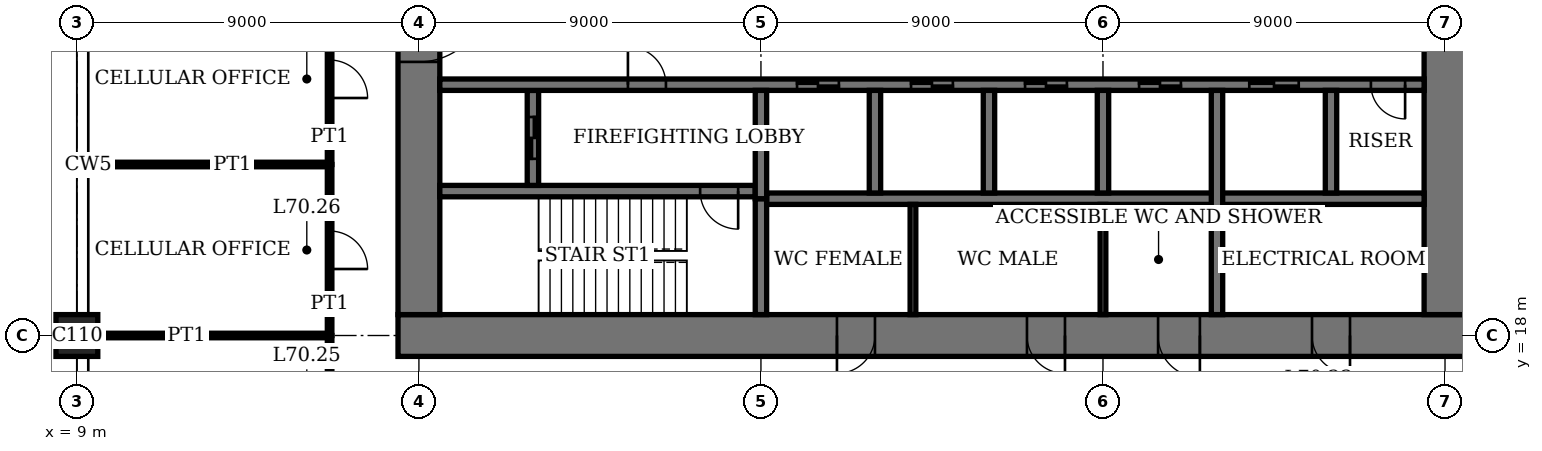
"""IFC4 building model, lengths in metres.
Left out: names, types, materials, properties, quantities, classifications, styles, units other than length and angle.
Written with IfcOpenShell. Run it as: python <this file> out.ifc"""

import sys

from ifc_helpers import new_model, si_unit, direction, frame, frame_2d, origin, origin_2d, place, context, subcontext, project, spatial, rectangle, extrude, element, fill, save


model = new_model("IFC4")
c1 = context("Model", 3, precision=1e-05, world=origin(), true_north=direction((0.0, 1.0)))
c2 = subcontext(c1, "Body", "Model", "MODEL_VIEW")
j1 = project(units=[si_unit("LENGTHUNIT", "METRE"), si_unit("PLANEANGLEUNIT", "RADIAN")], contexts=[c1])
p1 = place(None, origin())
s1 = spatial("IfcSite", under=j1, at=p1, CompositionType="ELEMENT")
p2 = place(p1, origin())
s2 = spatial("IfcBuilding", under=s1, at=p2, CompositionType="ELEMENT")
p3 = place(p2, frame((0.0, 0.0, 287.4)))
s3 = spatial("IfcBuildingStorey", under=s2, at=p3, CompositionType="ELEMENT", Elevation=287.4)
p4 = place(p3, frame((9.0, 18.0, 0.0), z_axis=(0.0, 0.0, 1.0), x_axis=(1.0, 0.0, 0.0)))
e1 = element("IfcColumn", 1, at=p4, inside=s3, PredefinedType="COLUMN", context=c2, shape_type="SweptSolid", body=[
    extrude(rectangle(XDim=1.1, YDim=1.1, at=origin_2d()), origin(), (0.0, 0.0, 1.0), 4.0),
])
p5 = place(p3, frame((17.45, 18.0, 0.0), z_axis=(0.0, 0.0, 1.0), x_axis=(1.0, 0.0, 0.0)))
e2 = element("IfcWall", 2, at=p5, inside=s3, PredefinedType="SHEAR", context=c2, shape_type="SweptSolid", body=[
    extrude(rectangle(XDim=28.1, YDim=1.1, at=frame_2d((14.05, 0.0))), origin(), (0.0, 0.0, 1.0), 4.0),
])
p6 = place(p5, frame((11.55, 0.0, 0.0)))
e3 = element("IfcOpeningElement", 3, at=p6, cuts=e2, PredefinedType="OPENING", context=c2, shape_type="SweptSolid", body=[
    extrude(rectangle(XDim=1.0, YDim=2.4, at=frame_2d((0.5, 1.2))), frame((0.0, 0.56, 0.0), z_axis=(0.0, -1.0, 0.0), x_axis=(1.0, 0.0, 0.0)), (0.0, 0.0, 1.0), 1.12),
])
p7 = place(p5, frame((16.55, 0.0, 0.0)))
e4 = element("IfcOpeningElement", 4, at=p7, cuts=e2, PredefinedType="OPENING", context=c2, shape_type="SweptSolid", body=[
    extrude(rectangle(XDim=1.0, YDim=2.4, at=frame_2d((0.5, 1.2))), frame((0.0, 0.56, 0.0), z_axis=(0.0, -1.0, 0.0), x_axis=(1.0, 0.0, 0.0)), (0.0, 0.0, 1.0), 1.12),
])
p8 = place(p5, frame((20.0, 0.0, 0.0)))
e5 = element("IfcOpeningElement", 5, at=p8, cuts=e2, PredefinedType="OPENING", context=c2, shape_type="SweptSolid", body=[
    extrude(rectangle(XDim=1.1, YDim=2.4, at=frame_2d((0.55, 1.2))), frame((0.0, 0.56, 0.0), z_axis=(0.0, -1.0, 0.0), x_axis=(1.0, 0.0, 0.0)), (0.0, 0.0, 1.0), 1.12),
])
p9 = place(p5, frame((24.05, 0.0, 0.0)))
e6 = element("IfcOpeningElement", 6, at=p9, cuts=e2, PredefinedType="OPENING", context=c2, shape_type="SweptSolid", body=[
    extrude(rectangle(XDim=1.0, YDim=2.4, at=frame_2d((0.5, 1.2))), frame((0.0, 0.56, 0.0), z_axis=(0.0, -1.0, 0.0), x_axis=(1.0, 0.0, 0.0)), (0.0, 0.0, 1.0), 1.12),
])
p10 = place(p3, frame((18.0, 35.45, 0.0), z_axis=(0.0, 0.0, 1.0), x_axis=(0.0, -1.0, 0.0)))
e7 = element("IfcWall", 7, at=p10, inside=s3, PredefinedType="SHEAR", context=c2, shape_type="SweptSolid", body=[
    extrude(rectangle(XDim=16.9, YDim=1.1, at=frame_2d((8.45, 0.0))), origin(), (0.0, 0.0, 1.0), 4.0),
])
p11 = place(p10, frame((8.45, 0.0, 0.0)))
e8 = element("IfcOpeningElement", 8, at=p11, cuts=e7, PredefinedType="OPENING", context=c2, shape_type="SweptSolid", body=[
    extrude(rectangle(XDim=1.8, YDim=2.4, at=frame_2d((0.9, 1.2))), frame((0.0, 0.56, 0.0), z_axis=(0.0, -1.0, 0.0), x_axis=(1.0, 0.0, 0.0)), (0.0, 0.0, 1.0), 1.12),
])
p12 = place(p3, frame((45.0, 18.55, 0.0), z_axis=(0.0, 0.0, 1.0), x_axis=(0.0, 1.0, 0.0)))
e9 = element("IfcWall", 9, at=p12, inside=s3, PredefinedType="SHEAR", context=c2, shape_type="SweptSolid", body=[
    extrude(rectangle(XDim=16.9, YDim=1.1, at=frame_2d((8.45, 0.0))), origin(), (0.0, 0.0, 1.0), 4.0),
])
p13 = place(p12, frame((8.45, 0.0, 0.0)))
e10 = element("IfcOpeningElement", 10, at=p13, cuts=e9, PredefinedType="OPENING", context=c2, shape_type="SweptSolid", body=[
    extrude(rectangle(XDim=1.8, YDim=2.4, at=frame_2d((0.9, 1.2))), frame((0.0, 0.56, 0.0), z_axis=(0.0, -1.0, 0.0), x_axis=(1.0, 0.0, 0.0)), (0.0, 0.0, 1.0), 1.12),
])
p14 = place(p3, frame((18.55, 21.8, 0.0), z_axis=(0.0, 0.0, 1.0), x_axis=(1.0, 0.0, 0.0)))
e11 = element("IfcWall", 11, at=p14, inside=s3, PredefinedType="SHEAR", context=c2, shape_type="SweptSolid", body=[
    extrude(rectangle(XDim=8.3, YDim=0.3, at=frame_2d((4.15, 0.0))), origin(), (0.0, 0.0, 1.0), 4.0),
])
p15 = place(p14, frame((6.85, 0.0, 0.0)))
e12 = element("IfcOpeningElement", 12, at=p15, cuts=e11, PredefinedType="OPENING", context=c2, shape_type="SweptSolid", body=[
    extrude(rectangle(XDim=1.0, YDim=2.4, at=frame_2d((0.5, 1.2))), frame((0.0, 0.16, 0.0), z_axis=(0.0, -1.0, 0.0), x_axis=(1.0, 0.0, 0.0)), (0.0, 0.0, 1.0), 0.32),
])
p16 = place(p3, frame((27.0, 18.55, 0.0), z_axis=(0.0, 0.0, 1.0), x_axis=(0.0, 1.0, 0.0)))
e13 = element("IfcWall", 13, at=p16, inside=s3, PredefinedType="SHEAR", context=c2, shape_type="SweptSolid", body=[
    extrude(rectangle(XDim=3.05, YDim=0.3, at=frame_2d((1.525, 0.0))), origin(), (0.0, 0.0, 1.0), 4.0),
])
p17 = place(p3, frame((21.0, 21.95, 0.0), z_axis=(0.0, 0.0, 1.0), x_axis=(0.0, 1.0, 0.0)))
e14 = element("IfcWall", 14, at=p17, inside=s3, PredefinedType="SHEAR", context=c2, shape_type="SweptSolid", body=[
    extrude(rectangle(XDim=2.5, YDim=0.3, at=frame_2d((1.25, 0.0))), origin(), (0.0, 0.0, 1.0), 4.0),
])
p18 = place(p17, frame((0.7, 0.0, 0.0)))
e15 = element("IfcOpeningElement", 15, at=p18, cuts=e14, PredefinedType="OPENING", context=c2, shape_type="SweptSolid", body=[
    extrude(rectangle(XDim=1.1, YDim=2.4, at=frame_2d((0.55, 1.2))), frame((0.0, 0.16, 0.0), z_axis=(0.0, -1.0, 0.0), x_axis=(1.0, 0.0, 0.0)), (0.0, 0.0, 1.0), 0.32),
])
p19 = place(p3, frame((18.55, 24.6, 0.0), z_axis=(0.0, 0.0, 1.0), x_axis=(1.0, 0.0, 0.0)))
e16 = element("IfcWall", 16, at=p19, inside=s3, PredefinedType="SHEAR", context=c2, shape_type="SweptSolid", body=[
    extrude(rectangle(XDim=25.9, YDim=0.3, at=frame_2d((12.95, 0.0))), origin(), (0.0, 0.0, 1.0), 4.0),
])
p20 = place(p19, frame((4.95, 0.0, 0.0)))
e17 = element("IfcOpeningElement", 17, at=p20, cuts=e16, PredefinedType="OPENING", context=c2, shape_type="SweptSolid", body=[
    extrude(rectangle(XDim=1.0, YDim=2.4, at=frame_2d((0.5, 1.2))), frame((0.0, 0.16, 0.0), z_axis=(0.0, -1.0, 0.0), x_axis=(1.0, 0.0, 0.0)), (0.0, 0.0, 1.0), 0.32),
])
p21 = place(p19, frame((24.5, 0.0, 0.0)))
e18 = element("IfcOpeningElement", 18, at=p21, cuts=e16, PredefinedType="OPENING", context=c2, shape_type="SweptSolid", body=[
    extrude(rectangle(XDim=0.9, YDim=2.1, at=frame_2d((0.45, 1.05))), frame((0.0, 0.16, 0.0), z_axis=(0.0, -1.0, 0.0), x_axis=(1.0, 0.0, 0.0)), (0.0, 0.0, 1.0), 0.32),
])
p22 = place(p19, frame((9.4, 0.0, 0.0)))
e19 = element("IfcOpeningElement", 19, at=p22, cuts=e16, PredefinedType="OPENING", context=c2, shape_type="SweptSolid", body=[
    extrude(rectangle(XDim=1.1, YDim=2.4, at=frame_2d((0.55, 1.2))), frame((0.0, 0.16, 0.0), z_axis=(0.0, -1.0, 0.0), x_axis=(1.0, 0.0, 0.0)), (0.0, 0.0, 1.0), 0.32),
])
p23 = place(p19, frame((12.4, 0.0, 0.0)))
e20 = element("IfcOpeningElement", 20, at=p23, cuts=e16, PredefinedType="OPENING", context=c2, shape_type="SweptSolid", body=[
    extrude(rectangle(XDim=1.1, YDim=2.4, at=frame_2d((0.55, 1.2))), frame((0.0, 0.16, 0.0), z_axis=(0.0, -1.0, 0.0), x_axis=(1.0, 0.0, 0.0)), (0.0, 0.0, 1.0), 0.32),
])
p24 = place(p19, frame((15.4, 0.0, 0.0)))
e21 = element("IfcOpeningElement", 21, at=p24, cuts=e16, PredefinedType="OPENING", context=c2, shape_type="SweptSolid", body=[
    extrude(rectangle(XDim=1.1, YDim=2.4, at=frame_2d((0.55, 1.2))), frame((0.0, 0.16, 0.0), z_axis=(0.0, -1.0, 0.0), x_axis=(1.0, 0.0, 0.0)), (0.0, 0.0, 1.0), 0.32),
])
p25 = place(p19, frame((18.4, 0.0, 0.0)))
e22 = element("IfcOpeningElement", 22, at=p25, cuts=e16, PredefinedType="OPENING", context=c2, shape_type="SweptSolid", body=[
    extrude(rectangle(XDim=1.1, YDim=2.4, at=frame_2d((0.55, 1.2))), frame((0.0, 0.16, 0.0), z_axis=(0.0, -1.0, 0.0), x_axis=(1.0, 0.0, 0.0)), (0.0, 0.0, 1.0), 0.32),
])
p26 = place(p19, frame((21.3, 0.0, 0.0)))
e23 = element("IfcOpeningElement", 23, at=p26, cuts=e16, PredefinedType="OPENING", context=c2, shape_type="SweptSolid", body=[
    extrude(rectangle(XDim=1.3, YDim=2.4, at=frame_2d((0.65, 1.2))), frame((0.0, 0.16, 0.0), z_axis=(0.0, -1.0, 0.0), x_axis=(1.0, 0.0, 0.0)), (0.0, 0.0, 1.0), 0.32),
])
p27 = place(p3, frame((27.15, 21.6, 0.0), z_axis=(0.0, 0.0, 1.0), x_axis=(1.0, 0.0, 0.0)))
e24 = element("IfcWall", 24, at=p27, inside=s3, PredefinedType="SHEAR", context=c2, shape_type="SweptSolid", body=[
    extrude(rectangle(XDim=17.3, YDim=0.3, at=frame_2d((8.65, 0.0))), origin(), (0.0, 0.0, 1.0), 4.0),
])
for number, where, z_axis, x_axis in (
    (25, (30.0, 21.75, 0.0), (0.0, 0.0, 1.0), (0.0, 1.0, 0.0)),
    (26, (33.0, 21.75, 0.0), (0.0, 0.0, 1.0), (0.0, 1.0, 0.0)),
    (27, (36.0, 21.75, 0.0), (0.0, 0.0, 1.0), (0.0, 1.0, 0.0)),
):
    element("IfcWall", number, at=place(p3, frame(where, z_axis=z_axis, x_axis=x_axis)), inside=s3, PredefinedType="SHEAR", context=c2, shape_type="SweptSolid", body=[
        extrude(rectangle(XDim=2.7, YDim=0.3, at=frame_2d((1.35, 0.0))), origin(), (0.0, 0.0, 1.0), 4.0),
    ])
p28 = place(p3, frame((39.0, 18.55, 0.0), z_axis=(0.0, 0.0, 1.0), x_axis=(0.0, 1.0, 0.0)))
e28 = element("IfcWall", 28, at=p28, inside=s3, PredefinedType="SHEAR", context=c2, shape_type="SweptSolid", body=[
    extrude(rectangle(XDim=5.9, YDim=0.3, at=frame_2d((2.95, 0.0))), origin(), (0.0, 0.0, 1.0), 4.0),
])
p29 = place(p3, frame((42.0, 21.75, 0.0), z_axis=(0.0, 0.0, 1.0), x_axis=(0.0, 1.0, 0.0)))
e29 = element("IfcWall", 29, at=p29, inside=s3, PredefinedType="SHEAR", context=c2, shape_type="SweptSolid", body=[
    extrude(rectangle(XDim=2.7, YDim=0.3, at=frame_2d((1.35, 0.0))), origin(), (0.0, 0.0, 1.0), 4.0),
])
p30 = place(p3, frame((27.0, 21.6, 0.0), z_axis=(0.0, 0.0, 1.0), x_axis=(0.0, 1.0, 0.0)))
e30 = element("IfcWall", 30, at=p30, inside=s3, PredefinedType="SHEAR", context=c2, shape_type="SweptSolid", body=[
    extrude(rectangle(XDim=2.85, YDim=0.3, at=frame_2d((1.425, 0.0))), origin(), (0.0, 0.0, 1.0), 4.0),
])
p31 = place(p3, frame((9.55, 18.0, 0.0), z_axis=(0.0, 0.0, 1.0), x_axis=(1.0, 0.0, 0.0)))
e31 = element("IfcWall", 31, at=p31, inside=s3, PredefinedType="PARTITIONING", context=c2, shape_type="SweptSolid", body=[
    extrude(rectangle(XDim=6.1, YDim=0.12, at=frame_2d((3.05, 0.0))), origin(), (0.0, 0.0, 1.0), 3.05),
])
p32 = place(p3, frame((9.31, 22.5, 0.0), z_axis=(0.0, 0.0, 1.0), x_axis=(1.0, 0.0, 0.0)))
e32 = element("IfcWall", 32, at=p32, inside=s3, PredefinedType="PARTITIONING", context=c2, shape_type="SweptSolid", body=[
    extrude(rectangle(XDim=6.34, YDim=0.12, at=frame_2d((3.17, 0.0))), origin(), (0.0, 0.0, 1.0), 3.1),
])
p33 = place(p3, frame((15.65, 13.5, 0.0), z_axis=(0.0, 0.0, 1.0), x_axis=(0.0, 1.0, 0.0)))
e33 = element("IfcWall", 33, at=p33, inside=s3, PredefinedType="PARTITIONING", context=c2, shape_type="SweptSolid", body=[
    extrude(rectangle(XDim=4.5, YDim=0.12, at=frame_2d((2.25, 0.0))), origin(), (0.0, 0.0, 1.0), 3.75),
])
p34 = place(p33, frame((2.35, 0.0, 0.0)))
e34 = element("IfcOpeningElement", 34, at=p34, cuts=e33, PredefinedType="OPENING", context=c2, shape_type="SweptSolid", body=[
    extrude(rectangle(XDim=1.0, YDim=2.4, at=frame_2d((0.5, 1.2))), frame((0.0, 0.07, 0.0), z_axis=(0.0, -1.0, 0.0), x_axis=(1.0, 0.0, 0.0)), (0.0, 0.0, 1.0), 0.14),
])
p35 = place(p3, frame((15.65, 18.0, 0.0), z_axis=(0.0, 0.0, 1.0), x_axis=(0.0, 1.0, 0.0)))
e35 = element("IfcWall", 35, at=p35, inside=s3, PredefinedType="PARTITIONING", context=c2, shape_type="SweptSolid", body=[
    extrude(rectangle(XDim=4.5, YDim=0.12, at=frame_2d((2.25, 0.0))), origin(), (0.0, 0.0, 1.0), 3.75),
])
p36 = place(p35, frame((1.75, 0.0, 0.0)))
e36 = element("IfcOpeningElement", 36, at=p36, cuts=e35, PredefinedType="OPENING", context=c2, shape_type="SweptSolid", body=[
    extrude(rectangle(XDim=1.0, YDim=2.4, at=frame_2d((0.5, 1.2))), frame((0.0, 0.07, 0.0), z_axis=(0.0, -1.0, 0.0), x_axis=(1.0, 0.0, 0.0)), (0.0, 0.0, 1.0), 0.14),
])
p37 = place(p3, frame((15.65, 22.5, 0.0), z_axis=(0.0, 0.0, 1.0), x_axis=(0.0, 1.0, 0.0)))
e37 = element("IfcWall", 37, at=p37, inside=s3, PredefinedType="PARTITIONING", context=c2, shape_type="SweptSolid", body=[
    extrude(rectangle(XDim=4.5, YDim=0.12, at=frame_2d((2.25, 0.0))), origin(), (0.0, 0.0, 1.0), 3.75),
])
p38 = place(p37, frame((1.75, 0.0, 0.0)))
e38 = element("IfcOpeningElement", 38, at=p38, cuts=e37, PredefinedType="OPENING", context=c2, shape_type="SweptSolid", body=[
    extrude(rectangle(XDim=1.0, YDim=2.4, at=frame_2d((0.5, 1.2))), frame((0.0, 0.07, 0.0), z_axis=(0.0, -1.0, 0.0), x_axis=(1.0, 0.0, 0.0)), (0.0, 0.0, 1.0), 0.14),
])
for number, where, z_axis, x_axis in (
    (39, (31.0, 18.55, 0.0), (0.0, 0.0, 1.0), (0.0, 1.0, 0.0)),
    (40, (36.0, 18.55, 0.0), (0.0, 0.0, 1.0), (0.0, 1.0, 0.0)),
):
    element("IfcWall", number, at=place(p3, frame(where, z_axis=z_axis, x_axis=x_axis)), inside=s3, PredefinedType="PARTITIONING", context=c2, shape_type="SweptSolid", body=[
        extrude(rectangle(XDim=2.9, YDim=0.15, at=frame_2d((1.45, 0.0))), origin(), (0.0, 0.0, 1.0), 3.75),
    ])
p39 = place(p11, origin())
e41 = element("IfcDoor", 41, at=p39, inside=s3, OperationType="DOUBLE_DOOR_DOUBLE_SWING", PredefinedType="DOOR", context=c2, shape_type="SweptSolid", body=[
    extrude(rectangle(XDim=1.8, YDim=2.4, at=frame_2d((0.9, 1.2))), frame((0.0, 0.03, 0.0), z_axis=(0.0, -1.0, 0.0), x_axis=(1.0, 0.0, 0.0)), (0.0, 0.0, 1.0), 0.06),
    extrude(rectangle(XDim=0.04, YDim=2.4, at=frame_2d((0.02, 1.2))), frame((0.0, 0.55, 0.0), z_axis=(0.0, -1.0, 0.0), x_axis=(1.0, 0.0, 0.0)), (0.0, 0.0, 1.0), 1.1),
    extrude(rectangle(XDim=0.04, YDim=2.4, at=frame_2d((1.78, 1.2))), frame((0.0, 0.55, 0.0), z_axis=(0.0, -1.0, 0.0), x_axis=(1.0, 0.0, 0.0)), (0.0, 0.0, 1.0), 1.1),
    extrude(rectangle(XDim=1.8, YDim=0.04, at=frame_2d((0.9, 2.38))), frame((0.0, 0.55, 0.0), z_axis=(0.0, -1.0, 0.0), x_axis=(1.0, 0.0, 0.0)), (0.0, 0.0, 1.0), 1.1),
])
fill(e8, e41)
p40 = place(p6, origin())
e42 = element("IfcDoor", 42, at=p40, inside=s3, OperationType="SINGLE_SWING_LEFT", PredefinedType="DOOR", context=c2, shape_type="SweptSolid", body=[
    extrude(rectangle(XDim=1.0, YDim=2.4, at=frame_2d((0.5, 1.2))), frame((0.0, 0.025, 0.0), z_axis=(0.0, -1.0, 0.0), x_axis=(1.0, 0.0, 0.0)), (0.0, 0.0, 1.0), 0.05),
    extrude(rectangle(XDim=0.04, YDim=2.4, at=frame_2d((0.02, 1.2))), frame((0.0, 0.4, 0.0), z_axis=(0.0, -1.0, 0.0), x_axis=(1.0, 0.0, 0.0)), (0.0, 0.0, 1.0), 0.8),
    extrude(rectangle(XDim=0.04, YDim=2.4, at=frame_2d((0.98, 1.2))), frame((0.0, 0.4, 0.0), z_axis=(0.0, -1.0, 0.0), x_axis=(1.0, 0.0, 0.0)), (0.0, 0.0, 1.0), 0.8),
    extrude(rectangle(XDim=1.0, YDim=0.04, at=frame_2d((0.5, 2.38))), frame((0.0, 0.4, 0.0), z_axis=(0.0, -1.0, 0.0), x_axis=(1.0, 0.0, 0.0)), (0.0, 0.0, 1.0), 0.8),
])
fill(e3, e42)
p41 = place(p7, origin())
e43 = element("IfcDoor", 43, at=p41, inside=s3, OperationType="SINGLE_SWING_RIGHT", PredefinedType="DOOR", context=c2, shape_type="SweptSolid", body=[
    extrude(rectangle(XDim=1.0, YDim=2.4, at=frame_2d((0.5, 1.2))), frame((0.0, 0.025, 0.0), z_axis=(0.0, -1.0, 0.0), x_axis=(1.0, 0.0, 0.0)), (0.0, 0.0, 1.0), 0.05),
    extrude(rectangle(XDim=0.04, YDim=2.4, at=frame_2d((0.02, 1.2))), frame((0.0, 0.4, 0.0), z_axis=(0.0, -1.0, 0.0), x_axis=(1.0, 0.0, 0.0)), (0.0, 0.0, 1.0), 0.8),
    extrude(rectangle(XDim=0.04, YDim=2.4, at=frame_2d((0.98, 1.2))), frame((0.0, 0.4, 0.0), z_axis=(0.0, -1.0, 0.0), x_axis=(1.0, 0.0, 0.0)), (0.0, 0.0, 1.0), 0.8),
    extrude(rectangle(XDim=1.0, YDim=0.04, at=frame_2d((0.5, 2.38))), frame((0.0, 0.4, 0.0), z_axis=(0.0, -1.0, 0.0), x_axis=(1.0, 0.0, 0.0)), (0.0, 0.0, 1.0), 0.8),
])
fill(e4, e43)
p42 = place(p8, origin())
e44 = element("IfcDoor", 44, at=p42, inside=s3, OperationType="SINGLE_SWING_RIGHT", PredefinedType="DOOR", context=c2, shape_type="SweptSolid", body=[
    extrude(rectangle(XDim=1.1, YDim=2.4, at=frame_2d((0.55, 1.2))), frame((0.0, 0.025, 0.0), z_axis=(0.0, -1.0, 0.0), x_axis=(1.0, 0.0, 0.0)), (0.0, 0.0, 1.0), 0.05),
    extrude(rectangle(XDim=0.04, YDim=2.4, at=frame_2d((0.02, 1.2))), frame((0.0, 0.44, 0.0), z_axis=(0.0, -1.0, 0.0), x_axis=(1.0, 0.0, 0.0)), (0.0, 0.0, 1.0), 0.88),
    extrude(rectangle(XDim=0.04, YDim=2.4, at=frame_2d((1.08, 1.2))), frame((0.0, 0.44, 0.0), z_axis=(0.0, -1.0, 0.0), x_axis=(1.0, 0.0, 0.0)), (0.0, 0.0, 1.0), 0.88),
    extrude(rectangle(XDim=1.1, YDim=0.04, at=frame_2d((0.55, 2.38))), frame((0.0, 0.44, 0.0), z_axis=(0.0, -1.0, 0.0), x_axis=(1.0, 0.0, 0.0)), (0.0, 0.0, 1.0), 0.88),
])
fill(e5, e44)
p43 = place(p9, origin())
e45 = element("IfcDoor", 45, at=p43, inside=s3, OperationType="SINGLE_SWING_RIGHT", PredefinedType="DOOR", context=c2, shape_type="SweptSolid", body=[
    extrude(rectangle(XDim=1.0, YDim=2.4, at=frame_2d((0.5, 1.2))), frame((0.0, 0.025, 0.0), z_axis=(0.0, -1.0, 0.0), x_axis=(1.0, 0.0, 0.0)), (0.0, 0.0, 1.0), 0.05),
    extrude(rectangle(XDim=0.04, YDim=2.4, at=frame_2d((0.02, 1.2))), frame((0.0, 0.4, 0.0), z_axis=(0.0, -1.0, 0.0), x_axis=(1.0, 0.0, 0.0)), (0.0, 0.0, 1.0), 0.8),
    extrude(rectangle(XDim=0.04, YDim=2.4, at=frame_2d((0.98, 1.2))), frame((0.0, 0.4, 0.0), z_axis=(0.0, -1.0, 0.0), x_axis=(1.0, 0.0, 0.0)), (0.0, 0.0, 1.0), 0.8),
    extrude(rectangle(XDim=1.0, YDim=0.04, at=frame_2d((0.5, 2.38))), frame((0.0, 0.4, 0.0), z_axis=(0.0, -1.0, 0.0), x_axis=(1.0, 0.0, 0.0)), (0.0, 0.0, 1.0), 0.8),
])
fill(e6, e45)
p44 = place(p15, origin())
e46 = element("IfcDoor", 46, at=p44, inside=s3, OperationType="SINGLE_SWING_RIGHT", PredefinedType="DOOR", context=c2, shape_type="SweptSolid", body=[
    extrude(rectangle(XDim=1.0, YDim=2.4, at=frame_2d((0.5, 1.2))), frame((0.0, 0.03, 0.0), z_axis=(0.0, -1.0, 0.0), x_axis=(1.0, 0.0, 0.0)), (0.0, 0.0, 1.0), 0.06),
])
fill(e12, e46)
p45 = place(p20, origin())
e47 = element("IfcDoor", 47, at=p45, inside=s3, OperationType="SINGLE_SWING_RIGHT", PredefinedType="DOOR", context=c2, shape_type="SweptSolid", body=[
    extrude(rectangle(XDim=1.0, YDim=2.4, at=frame_2d((0.5, 1.2))), frame((0.0, 0.03, 0.0), z_axis=(0.0, -1.0, 0.0), x_axis=(1.0, 0.0, 0.0)), (0.0, 0.0, 1.0), 0.06),
])
fill(e17, e47)
p46 = place(p21, origin())
e48 = element("IfcDoor", 48, at=p46, inside=s3, OperationType="SINGLE_SWING_RIGHT", PredefinedType="DOOR", context=c2, shape_type="SweptSolid", body=[
    extrude(rectangle(XDim=0.9, YDim=2.1, at=frame_2d((0.45, 1.05))), frame((0.0, 0.03, 0.0), z_axis=(0.0, -1.0, 0.0), x_axis=(1.0, 0.0, 0.0)), (0.0, 0.0, 1.0), 0.06),
])
fill(e18, e48)
p47 = place(p36, origin())
e49 = element("IfcDoor", 49, at=p47, inside=s3, OperationType="SINGLE_SWING_LEFT", PredefinedType="DOOR", context=c2, shape_type="SweptSolid", body=[
    extrude(rectangle(XDim=1.0, YDim=2.4, at=frame_2d((0.5, 1.2))), frame((0.0, 0.025, 0.0), z_axis=(0.0, -1.0, 0.0), x_axis=(1.0, 0.0, 0.0)), (0.0, 0.0, 1.0), 0.05),
])
fill(e36, e49)
p48 = place(p38, origin())
e50 = element("IfcDoor", 50, at=p48, inside=s3, OperationType="SINGLE_SWING_LEFT", PredefinedType="DOOR", context=c2, shape_type="SweptSolid", body=[
    extrude(rectangle(XDim=1.0, YDim=2.4, at=frame_2d((0.5, 1.2))), frame((0.0, 0.025, 0.0), z_axis=(0.0, -1.0, 0.0), x_axis=(1.0, 0.0, 0.0)), (0.0, 0.0, 1.0), 0.05),
])
fill(e38, e50)
p49 = place(p22, origin())
e51 = element("IfcDoor", 51, at=p49, inside=s3, OperationType="DOUBLE_DOOR_SLIDING", PredefinedType="DOOR", context=c2, shape_type="SweptSolid", body=[
    extrude(rectangle(XDim=1.1, YDim=2.4, at=frame_2d((0.55, 1.2))), frame((0.0, 0.02, 0.0), z_axis=(0.0, -1.0, 0.0), x_axis=(1.0, 0.0, 0.0)), (0.0, 0.0, 1.0), 0.04),
])
fill(e19, e51)
p50 = place(p23, origin())
e52 = element("IfcDoor", 52, at=p50, inside=s3, OperationType="DOUBLE_DOOR_SLIDING", PredefinedType="DOOR", context=c2, shape_type="SweptSolid", body=[
    extrude(rectangle(XDim=1.1, YDim=2.4, at=frame_2d((0.55, 1.2))), frame((0.0, 0.02, 0.0), z_axis=(0.0, -1.0, 0.0), x_axis=(1.0, 0.0, 0.0)), (0.0, 0.0, 1.0), 0.04),
])
fill(e20, e52)
p51 = place(p24, origin())
e53 = element("IfcDoor", 53, at=p51, inside=s3, OperationType="DOUBLE_DOOR_SLIDING", PredefinedType="DOOR", context=c2, shape_type="SweptSolid", body=[
    extrude(rectangle(XDim=1.1, YDim=2.4, at=frame_2d((0.55, 1.2))), frame((0.0, 0.02, 0.0), z_axis=(0.0, -1.0, 0.0), x_axis=(1.0, 0.0, 0.0)), (0.0, 0.0, 1.0), 0.04),
])
fill(e21, e53)
p52 = place(p25, origin())
e54 = element("IfcDoor", 54, at=p52, inside=s3, OperationType="DOUBLE_DOOR_SLIDING", PredefinedType="DOOR", context=c2, shape_type="SweptSolid", body=[
    extrude(rectangle(XDim=1.1, YDim=2.4, at=frame_2d((0.55, 1.2))), frame((0.0, 0.02, 0.0), z_axis=(0.0, -1.0, 0.0), x_axis=(1.0, 0.0, 0.0)), (0.0, 0.0, 1.0), 0.04),
])
fill(e22, e54)
p53 = place(p26, origin())
e55 = element("IfcDoor", 55, at=p53, inside=s3, OperationType="DOUBLE_DOOR_SLIDING", PredefinedType="DOOR", context=c2, shape_type="SweptSolid", body=[
    extrude(rectangle(XDim=1.3, YDim=2.4, at=frame_2d((0.65, 1.2))), frame((0.0, 0.02, 0.0), z_axis=(0.0, -1.0, 0.0), x_axis=(1.0, 0.0, 0.0)), (0.0, 0.0, 1.0), 0.04),
])
fill(e23, e55)
p54 = place(p18, origin())
e56 = element("IfcDoor", 56, at=p54, inside=s3, OperationType="DOUBLE_DOOR_SLIDING", PredefinedType="DOOR", context=c2, shape_type="SweptSolid", body=[
    extrude(rectangle(XDim=1.1, YDim=2.4, at=frame_2d((0.55, 1.2))), frame((0.0, 0.03, 0.0), z_axis=(0.0, -1.0, 0.0), x_axis=(1.0, 0.0, 0.0)), (0.0, 0.0, 1.0), 0.06),
])
fill(e15, e56)
save(model, sys.argv[1])
